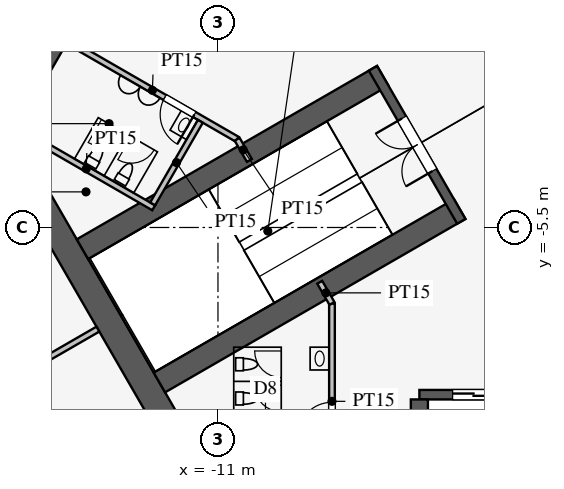
"""IFC4 building model, lengths in metres.
Left out: names, types, materials, properties, quantities, classifications, styles, units other than length and angle.
Written with IfcOpenShell. Run it as: python <this file> out.ifc"""

import sys

from ifc_helpers import new_model, si_unit, direction, frame, frame_2d, origin, place, context, subcontext, project, spatial, rectangle, extrude, element, fill, save


model = new_model("IFC4")
c1 = context("Model", 3, precision=1e-05, world=origin(), true_north=direction((0.0, 1.0)))
c2 = subcontext(c1, "Body", "Model", "MODEL_VIEW")
j1 = project(units=[si_unit("LENGTHUNIT", "METRE"), si_unit("PLANEANGLEUNIT", "RADIAN")], contexts=[c1])
p1 = place(None, origin())
s1 = spatial("IfcSite", under=j1, at=p1, CompositionType="ELEMENT")
p2 = place(p1, origin())
s2 = spatial("IfcBuilding", under=s1, at=p2, CompositionType="ELEMENT")
p3 = place(p2, frame((0.0, 0.0, 280.5)))
s3 = spatial("IfcBuildingStorey", under=s2, at=p3, CompositionType="ELEMENT", Elevation=280.5)
p4 = place(p3, frame((-5.773, 16.0, 0.0), z_axis=(0.0, 0.0, 1.0), x_axis=(-0.500002442456, -0.866023993627, 0.0)))
e1 = element("IfcWall", 1, at=p4, inside=s3, PredefinedType="SHEAR", context=c2, shape_type="SweptSolid", body=[
    extrude(rectangle(XDim=21.939, YDim=0.7, at=frame_2d((10.97, 0.0))), origin(), (0.0, 0.0, 1.0), 4.2),
])
p5 = place(p4, frame((17.27, 0.0, 0.0)))
e2 = element("IfcOpeningElement", 2, at=p5, cuts=e1, PredefinedType="OPENING", context=c2, shape_type="SweptSolid", body=[
    extrude(rectangle(XDim=1.2, YDim=2.1, at=frame_2d((0.6, 1.05))), frame((0.0, 0.36, 0.0), z_axis=(0.0, -1.0, 0.0), x_axis=(1.0, 0.0, 0.0)), (0.0, 0.0, 1.0), 0.72),
])
p6 = place(p4, frame((3.47, 0.0, 0.0)))
e3 = element("IfcOpeningElement", 3, at=p6, cuts=e1, PredefinedType="OPENING", context=c2, shape_type="SweptSolid", body=[
    extrude(rectangle(XDim=1.2, YDim=2.1, at=frame_2d((0.6, 1.05))), frame((0.0, 0.36, 0.0), z_axis=(0.0, -1.0, 0.0), x_axis=(1.0, 0.0, 0.0)), (0.0, 0.0, 1.0), 0.72),
])
p7 = place(p3, frame((-16.743, -3.0, 0.0), z_axis=(0.0, 0.0, 1.0), x_axis=(0.499995765644, -0.866027848477, 0.0)))
e4 = element("IfcWall", 4, at=p7, inside=s3, PredefinedType="SHEAR", context=c2, shape_type="SweptSolid", body=[
    extrude(rectangle(XDim=11.547, YDim=0.7, at=frame_2d((5.773, 0.0))), origin(), (0.0, 0.0, 1.0), 4.2),
])
p8 = place(p3, frame((-5.7, -9.9, 0.0), z_axis=(0.0, 0.0, 1.0), x_axis=(1.0, 0.0, 0.0)))
e5 = element("IfcWall", 5, at=p8, inside=s3, PredefinedType="SHEAR", context=c2, shape_type="SweptSolid", body=[
    extrude(rectangle(XDim=11.4, YDim=0.25, at=frame_2d((5.7, 0.0))), origin(), (0.0, 0.0, 1.0), 4.2),
])
p9 = place(p8, frame((0.875, 0.0, 0.0)))
e6 = element("IfcOpeningElement", 6, at=p9, cuts=e5, PredefinedType="OPENING", context=c2, shape_type="SweptSolid", body=[
    extrude(rectangle(XDim=1.1, YDim=2.2, at=frame_2d((0.55, 1.1))), frame((0.0, 0.135, 0.0), z_axis=(0.0, -1.0, 0.0), x_axis=(1.0, 0.0, 0.0)), (0.0, 0.0, 1.0), 0.27),
])
p10 = place(p8, frame((3.725, 0.0, 0.0)))
e7 = element("IfcOpeningElement", 7, at=p10, cuts=e5, PredefinedType="OPENING", context=c2, shape_type="SweptSolid", body=[
    extrude(rectangle(XDim=1.1, YDim=2.2, at=frame_2d((0.55, 1.1))), frame((0.0, 0.135, 0.0), z_axis=(0.0, -1.0, 0.0), x_axis=(1.0, 0.0, 0.0)), (0.0, 0.0, 1.0), 0.27),
])
p11 = place(p8, frame((6.575, 0.0, 0.0)))
e8 = element("IfcOpeningElement", 8, at=p11, cuts=e5, PredefinedType="OPENING", context=c2, shape_type="SweptSolid", body=[
    extrude(rectangle(XDim=1.1, YDim=2.2, at=frame_2d((0.55, 1.1))), frame((0.0, 0.135, 0.0), z_axis=(0.0, -1.0, 0.0), x_axis=(1.0, 0.0, 0.0)), (0.0, 0.0, 1.0), 0.27),
])
p12 = place(p8, frame((9.425, 0.0, 0.0)))
e9 = element("IfcOpeningElement", 9, at=p12, cuts=e5, PredefinedType="OPENING", context=c2, shape_type="SweptSolid", body=[
    extrude(rectangle(XDim=1.1, YDim=2.2, at=frame_2d((0.55, 1.1))), frame((0.0, 0.135, 0.0), z_axis=(0.0, -1.0, 0.0), x_axis=(1.0, 0.0, 0.0)), (0.0, 0.0, 1.0), 0.27),
])
p13 = place(p3, frame((-5.7, -10.025, 0.0), z_axis=(0.0, 0.0, 1.0), x_axis=(0.0, -1.0, 0.0)))
e10 = element("IfcWall", 10, at=p13, inside=s3, PredefinedType="SHEAR", context=c2, shape_type="SweptSolid", body=[
    extrude(rectangle(XDim=2.625, YDim=0.45, at=frame_2d((1.312, 0.0))), origin(), (0.0, 0.0, 1.0), 4.2),
])
for number, where, z_axis, x_axis in (
    (11, (-6.663, -1.509, 0.0), (0.0, 0.0, 1.0), (-0.866, -0.5, 0.0)),
    (12, (-4.638, -5.016, 0.0), (0.0, 0.0, 1.0), (-0.866, -0.5, 0.0)),
):
    element("IfcWall", number, at=place(p3, frame(where, z_axis=z_axis, x_axis=x_axis)), inside=s3, PredefinedType="SHEAR", context=c2, shape_type="SweptSolid", body=[
        extrude(rectangle(XDim=9.125, YDim=0.6, at=frame_2d((4.562, 0.0))), origin(), (0.0, 0.0, 1.0), 4.2),
    ])
p14 = place(p3, frame((-6.922, -1.312, 0.0), z_axis=(0.0, 0.0, 1.0), x_axis=(0.499984536904, -0.866034331223, 0.0)))
e13 = element("IfcWall", 13, at=p14, inside=s3, PredefinedType="SHEAR", context=c2, shape_type="SweptSolid", body=[
    extrude(rectangle(XDim=4.65, YDim=0.25, at=frame_2d((2.325, 0.0))), origin(), (0.0, 0.0, 1.0), 4.2),
])
p15 = place(p14, frame((1.525, 0.0, 0.0)))
e14 = element("IfcOpeningElement", 14, at=p15, cuts=e13, PredefinedType="OPENING", context=c2, shape_type="SweptSolid", body=[
    extrude(rectangle(XDim=1.6, YDim=2.1, at=frame_2d((0.8, 1.05))), frame((0.0, 0.135, 0.0), z_axis=(0.0, -1.0, 0.0), x_axis=(1.0, 0.0, 0.0)), (0.0, 0.0, 1.0), 0.27),
])
p16 = place(p3, frame((-8.0, -7.5, 0.0), z_axis=(0.0, 0.0, 1.0), x_axis=(0.0, -1.0, 0.0)))
e15 = element("IfcWall", 15, at=p16, inside=s3, PredefinedType="PARTITIONING", context=c2, shape_type="SweptSolid", body=[
    extrude(rectangle(XDim=5.15, YDim=0.15, at=frame_2d((2.575, 0.0))), origin(), (0.0, 0.0, 1.0), 4.0),
])
p17 = place(p16, frame((2.6, 0.0, 0.0)))
e16 = element("IfcOpeningElement", 16, at=p17, cuts=e15, PredefinedType="OPENING", context=c2, shape_type="SweptSolid", body=[
    extrude(rectangle(XDim=0.9, YDim=2.1, at=frame_2d((0.45, 1.05))), frame((0.0, 0.085, 0.0), z_axis=(0.0, -1.0, 0.0), x_axis=(1.0, 0.0, 0.0)), (0.0, 0.0, 1.0), 0.17),
])
p18 = place(p3, frame((-10.495, -3.178, 0.0), z_axis=(0.0, 0.0, 1.0), x_axis=(-0.866037967349, 0.499978238636, 0.0)))
e17 = element("IfcWall", 17, at=p18, inside=s3, PredefinedType="PARTITIONING", context=c2, shape_type="SweptSolid", body=[
    extrude(rectangle(XDim=5.15, YDim=0.15, at=frame_2d((2.575, 0.0))), origin(), (0.0, 0.0, 1.0), 4.0),
])
p19 = place(p18, frame((1.3, 0.0, 0.0)))
e18 = element("IfcOpeningElement", 18, at=p19, cuts=e17, PredefinedType="OPENING", context=c2, shape_type="SweptSolid", body=[
    extrude(rectangle(XDim=0.9, YDim=2.1, at=frame_2d((0.45, 1.05))), frame((0.0, 0.085, 0.0), z_axis=(0.0, -1.0, 0.0), x_axis=(1.0, 0.0, 0.0)), (0.0, 0.0, 1.0), 0.17),
])
for number, where, z_axis, x_axis in (
    (19, (-10.495, -3.178, 0.0), (0.0, 0.0, 1.0), (0.5, -0.866, 0.0)),
    (20, (-8.0, -7.5, 0.0), (0.0, 0.0, 1.0), (-0.5, 0.866, 0.0)),
):
    element("IfcWall", number, at=place(p3, frame(where, z_axis=z_axis, x_axis=x_axis)), inside=s3, PredefinedType="PARTITIONING", context=c2, shape_type="SweptSolid", body=[
        extrude(rectangle(XDim=0.645, YDim=0.15, at=frame_2d((0.323, 0.0))), origin(), (0.0, 0.0, 1.0), 4.0),
    ])
p20 = place(p3, frame((-12.691, -4.982, 0.0), z_axis=(0.0, 0.0, 1.0), x_axis=(-0.8660249478, 0.500000789788, 0.0)))
e21 = element("IfcWall", 21, at=p20, inside=s3, PredefinedType="PARTITIONING", context=c2, shape_type="SweptSolid", body=[
    extrude(rectangle(XDim=4.1, YDim=0.15, at=frame_2d((2.05, 0.0))), origin(), (0.0, 0.0, 1.0), 4.0),
])
p21 = place(p3, frame((-11.464, -2.706, 0.0), z_axis=(0.0, 0.0, 1.0), x_axis=(-0.50001992892, -0.866013897511, 0.0)))
e22 = element("IfcWall", 22, at=p21, inside=s3, PredefinedType="PARTITIONING", context=c2, shape_type="SweptSolid", body=[
    extrude(rectangle(XDim=2.51, YDim=0.15, at=frame_2d((1.255, 0.0))), origin(), (0.0, 0.0, 1.0), 4.0),
])
p22 = place(p3, frame((-14.159, -8.175, 0.0), z_axis=(0.0, 0.0, 1.0), x_axis=(-0.866026905467, -0.499997399001, 0.0)))
e23 = element("IfcWall", 23, at=p22, inside=s3, PredefinedType="PARTITIONING", context=c2, shape_type="SweptSolid", body=[
    extrude(rectangle(XDim=13.4, YDim=0.15, at=frame_2d((6.7, 0.0))), origin(), (0.0, 0.0, 1.0), 2.5),
])
p23 = place(p17, frame((0.9, 0.0, 0.0), z_axis=(0.0, 0.0, 1.0), x_axis=(-1.0, 0.0, 0.0)))
e24 = element("IfcDoor", 24, at=p23, inside=s3, OperationType="SINGLE_SWING_LEFT", PredefinedType="DOOR", context=c2, shape_type="SweptSolid", body=[
    extrude(rectangle(XDim=0.9, YDim=2.1, at=frame_2d((0.45, 1.05))), frame((0.0, 0.025, 0.0), z_axis=(0.0, -1.0, 0.0), x_axis=(1.0, 0.0, 0.0)), (0.0, 0.0, 1.0), 0.05),
])
fill(e16, e24)
p24 = place(p19, origin())
e25 = element("IfcDoor", 25, at=p24, inside=s3, OperationType="SINGLE_SWING_LEFT", PredefinedType="DOOR", context=c2, shape_type="SweptSolid", body=[
    extrude(rectangle(XDim=0.9, YDim=2.1, at=frame_2d((0.45, 1.05))), frame((0.0, 0.025, 0.0), z_axis=(0.0, -1.0, 0.0), x_axis=(1.0, 0.0, 0.0)), (0.0, 0.0, 1.0), 0.05),
])
fill(e18, e25)
p25 = place(p15, frame((1.6, 0.0, 0.0), z_axis=(0.0, 0.0, 1.0), x_axis=(-1.0, 0.0, 0.0)))
e26 = element("IfcDoor", 26, at=p25, inside=s3, OperationType="DOUBLE_DOOR_SINGLE_SWING", PredefinedType="DOOR", context=c2, shape_type="SweptSolid", body=[
    extrude(rectangle(XDim=1.6, YDim=2.1, at=frame_2d((0.8, 1.05))), frame((0.0, 0.025, 0.0), z_axis=(0.0, -1.0, 0.0), x_axis=(1.0, 0.0, 0.0)), (0.0, 0.0, 1.0), 0.05),
])
fill(e14, e26)
p26 = place(p9, origin())
e27 = element("IfcDoor", 27, at=p26, inside=s3, OperationType="DOUBLE_DOOR_SLIDING", PredefinedType="DOOR", context=c2, shape_type="SweptSolid", body=[
    extrude(rectangle(XDim=1.1, YDim=2.2, at=frame_2d((0.55, 1.1))), frame((0.0, 0.025, 0.0), z_axis=(0.0, -1.0, 0.0), x_axis=(1.0, 0.0, 0.0)), (0.0, 0.0, 1.0), 0.05),
])
fill(e6, e27)
save(model, sys.argv[1])
